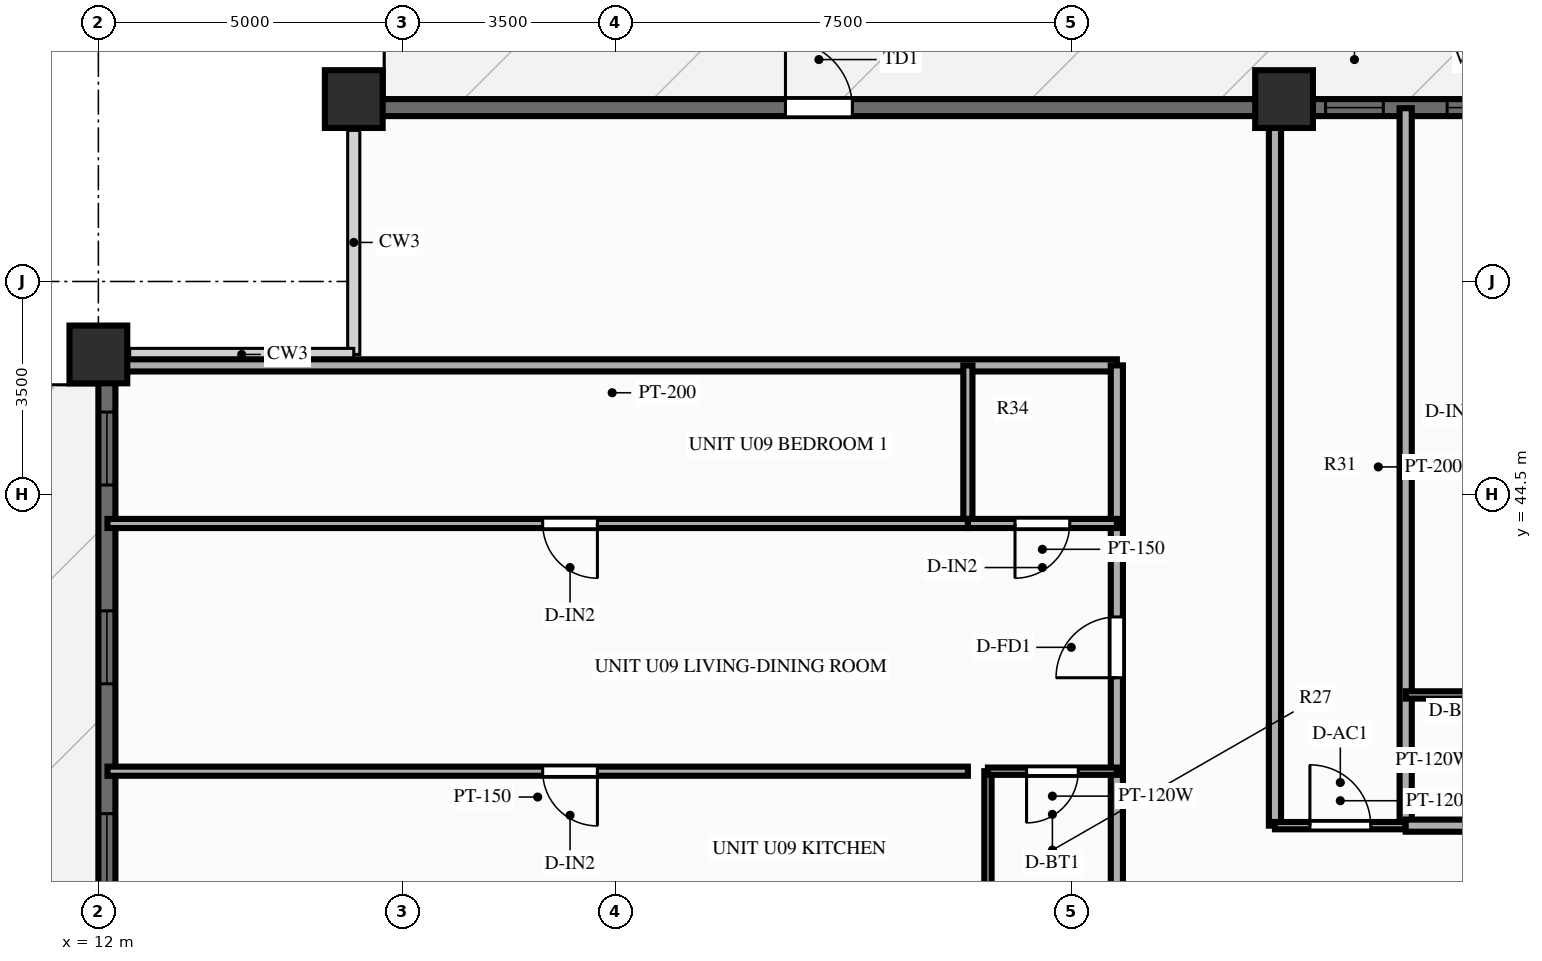
"""IFC4 building model, lengths in metres.
Left out: names, types, materials, properties, quantities, classifications, styles, units other than length and angle.
Written with IfcOpenShell. Run it as: python <this file> out.ifc"""

import sys

from ifc_helpers import new_model, si_unit, direction, frame, frame_2d, origin, origin_2d, place, context, subcontext, project, spatial, rectangle, extrude, source, transform, mapped, element, fill, save


model = new_model("IFC4")
c1 = context("Model", 3, precision=1e-05, world=origin(), true_north=direction((0.0, 1.0)))
c2 = subcontext(c1, "Body", "Model", "MODEL_VIEW")
j1 = project(units=[si_unit("LENGTHUNIT", "METRE"), si_unit("PLANEANGLEUNIT", "RADIAN")], contexts=[c1])
p1 = place(None, origin())
s1 = spatial("IfcSite", under=j1, at=p1, CompositionType="ELEMENT")
p2 = place(p1, origin())
s2 = spatial("IfcBuilding", under=s1, at=p2, CompositionType="ELEMENT")
p3 = place(p2, frame((0.0, 0.0, 107.85)))
s3 = spatial("IfcBuildingStorey", under=s2, at=p3, CompositionType="ELEMENT", Elevation=107.85)
m1 = source(origin(), c2, "Body", "SweptSolid", [
    extrude(rectangle(XDim=0.95, YDim=0.95, at=origin_2d()), origin(), (0.0, 0.0, 1.0), 3.0),
])
for number, where, z_axis, x_axis in (
    (1, (31.5, 51.0, 0.0), (0.0, 0.0, 1.0), (1.0, 0.0, 0.0)),
    (2, (16.2, 51.0, 0.0), (0.0, 0.0, 1.0), (1.0, 0.0, 0.0)),
    (3, (12.0, 46.8, 0.0), (0.0, 0.0, 1.0), (1.0, 0.0, 0.0)),
):
    element("IfcColumn", number, at=place(p3, frame(where, z_axis=z_axis, x_axis=x_axis)), inside=s3, PredefinedType="COLUMN", context=c2, shape_type="MappedRepresentation", body=[
        mapped(m1, transform((0.0, 0.0, 0.0), scale=1.0)),
    ])
p4 = place(p3, frame((16.2, 50.86, 0.0), z_axis=(0.0, 0.0, 1.0), x_axis=(1.0, 0.0, 0.0)))
e4 = element("IfcWall", 4, at=p4, inside=s3, PredefinedType="SOLIDWALL", context=c2, shape_type="SweptSolid", body=[
    extrude(rectangle(XDim=43.6, YDim=0.28, at=frame_2d((21.8, 0.0))), origin(), (0.0, 0.0, 1.0), 2.28),
])
p5 = place(p4, frame((7.1, 0.0, 0.0)))
e5 = element("IfcOpeningElement", 5, at=p5, cuts=e4, PredefinedType="OPENING", context=c2, shape_type="SweptSolid", body=[
    extrude(rectangle(XDim=1.1, YDim=2.15, at=frame_2d((0.55, 1.075))), frame((0.0, 0.152, 0.0), z_axis=(0.0, -1.0, 0.0), x_axis=(1.0, 0.0, 0.0)), (0.0, 0.0, 1.0), 0.304),
])
p6 = place(p4, frame((15.982, 0.0, 0.25)))
e6 = element("IfcOpeningElement", 6, at=p6, cuts=e4, PredefinedType="OPENING", context=c2, shape_type="SweptSolid", body=[
    extrude(rectangle(XDim=0.95, YDim=1.5, at=frame_2d((0.475, 0.75))), frame((0.0, 0.152, 0.0), z_axis=(0.0, -1.0, 0.0), x_axis=(1.0, 0.0, 0.0)), (0.0, 0.0, 1.0), 0.304),
])
p7 = place(p4, frame((17.982, 0.0, 0.25)))
e7 = element("IfcOpeningElement", 7, at=p7, cuts=e4, PredefinedType="OPENING", context=c2, shape_type="SweptSolid", body=[
    extrude(rectangle(XDim=1.2, YDim=1.5, at=frame_2d((0.6, 0.75))), frame((0.0, 0.152, 0.0), z_axis=(0.0, -1.0, 0.0), x_axis=(1.0, 0.0, 0.0)), (0.0, 0.0, 1.0), 0.304),
])
p8 = place(p4, frame((20.77, 0.0, 0.25)))
e8 = element("IfcOpeningElement", 8, at=p8, cuts=e4, PredefinedType="OPENING", context=c2, shape_type="SweptSolid", body=[
    extrude(rectangle(XDim=1.2, YDim=1.5, at=frame_2d((0.6, 0.75))), frame((0.0, 0.152, 0.0), z_axis=(0.0, -1.0, 0.0), x_axis=(1.0, 0.0, 0.0)), (0.0, 0.0, 1.0), 0.304),
])
p9 = place(p4, frame((23.78, 0.0, 0.25)))
e9 = element("IfcOpeningElement", 9, at=p9, cuts=e4, PredefinedType="OPENING", context=c2, shape_type="SweptSolid", body=[
    extrude(rectangle(XDim=1.2, YDim=1.5, at=frame_2d((0.6, 0.75))), frame((0.0, 0.152, 0.0), z_axis=(0.0, -1.0, 0.0), x_axis=(1.0, 0.0, 0.0)), (0.0, 0.0, 1.0), 0.304),
])
p10 = place(p4, frame((26.335, 0.0, 0.25)))
e10 = element("IfcOpeningElement", 10, at=p10, cuts=e4, PredefinedType="OPENING", context=c2, shape_type="SweptSolid", body=[
    extrude(rectangle(XDim=1.2, YDim=1.5, at=frame_2d((0.6, 0.75))), frame((0.0, 0.152, 0.0), z_axis=(0.0, -1.0, 0.0), x_axis=(1.0, 0.0, 0.0)), (0.0, 0.0, 1.0), 0.304),
])
p11 = place(p4, frame((35.35, 0.0, 0.25)))
e11 = element("IfcOpeningElement", 11, at=p11, cuts=e4, PredefinedType="OPENING", context=c2, shape_type="SweptSolid", body=[
    extrude(rectangle(XDim=1.2, YDim=1.5, at=frame_2d((0.6, 0.75))), frame((0.0, 0.152, 0.0), z_axis=(0.0, -1.0, 0.0), x_axis=(1.0, 0.0, 0.0)), (0.0, 0.0, 1.0), 0.304),
])
p12 = place(p3, frame((12.14, 7.2, 0.0), z_axis=(0.0, 0.0, 1.0), x_axis=(0.0, 1.0, 0.0)))
e12 = element("IfcWall", 12, at=p12, inside=s3, PredefinedType="SOLIDWALL", context=c2, shape_type="SweptSolid", body=[
    extrude(rectangle(XDim=39.6, YDim=0.28, at=frame_2d((19.8, 0.0))), origin(), (0.0, 0.0, 1.0), 2.28),
])
p13 = place(p12, frame((0.945, 0.0, 0.25)))
e13 = element("IfcOpeningElement", 13, at=p13, cuts=e12, PredefinedType="OPENING", context=c2, shape_type="SweptSolid", body=[
    extrude(rectangle(XDim=1.2, YDim=1.5, at=frame_2d((0.6, 0.75))), frame((0.0, 0.152, 0.0), z_axis=(0.0, -1.0, 0.0), x_axis=(1.0, 0.0, 0.0)), (0.0, 0.0, 1.0), 0.304),
])
p14 = place(p12, frame((4.213, 0.0, 0.25)))
e14 = element("IfcOpeningElement", 14, at=p14, cuts=e12, PredefinedType="OPENING", context=c2, shape_type="SweptSolid", body=[
    extrude(rectangle(XDim=1.2, YDim=1.5, at=frame_2d((0.6, 0.75))), frame((0.0, 0.152, 0.0), z_axis=(0.0, -1.0, 0.0), x_axis=(1.0, 0.0, 0.0)), (0.0, 0.0, 1.0), 0.304),
])
p15 = place(p12, frame((7.55, 0.0, 0.25)))
e15 = element("IfcOpeningElement", 15, at=p15, cuts=e12, PredefinedType="OPENING", context=c2, shape_type="SweptSolid", body=[
    extrude(rectangle(XDim=1.2, YDim=1.5, at=frame_2d((0.6, 0.75))), frame((0.0, 0.152, 0.0), z_axis=(0.0, -1.0, 0.0), x_axis=(1.0, 0.0, 0.0)), (0.0, 0.0, 1.0), 0.304),
])
p16 = place(p12, frame((13.483, 0.0, 0.25)))
e16 = element("IfcOpeningElement", 16, at=p16, cuts=e12, PredefinedType="OPENING", context=c2, shape_type="SweptSolid", body=[
    extrude(rectangle(XDim=1.2, YDim=1.5, at=frame_2d((0.6, 0.75))), frame((0.0, 0.152, 0.0), z_axis=(0.0, -1.0, 0.0), x_axis=(1.0, 0.0, 0.0)), (0.0, 0.0, 1.0), 0.304),
])
p17 = place(p12, frame((16.82, 0.0, 0.25)))
e17 = element("IfcOpeningElement", 17, at=p17, cuts=e12, PredefinedType="OPENING", context=c2, shape_type="SweptSolid", body=[
    extrude(rectangle(XDim=1.2, YDim=1.5, at=frame_2d((0.6, 0.75))), frame((0.0, 0.152, 0.0), z_axis=(0.0, -1.0, 0.0), x_axis=(1.0, 0.0, 0.0)), (0.0, 0.0, 1.0), 0.304),
])
p18 = place(p12, frame((19.2, 0.0, 0.25)))
e18 = element("IfcOpeningElement", 18, at=p18, cuts=e12, PredefinedType="OPENING", context=c2, shape_type="SweptSolid", body=[
    extrude(rectangle(XDim=1.2, YDim=1.5, at=frame_2d((0.6, 0.75))), frame((0.0, 0.152, 0.0), z_axis=(0.0, -1.0, 0.0), x_axis=(1.0, 0.0, 0.0)), (0.0, 0.0, 1.0), 0.304),
])
p19 = place(p12, frame((21.578, 0.0, 0.25)))
e19 = element("IfcOpeningElement", 19, at=p19, cuts=e12, PredefinedType="OPENING", context=c2, shape_type="SweptSolid", body=[
    extrude(rectangle(XDim=1.2, YDim=1.5, at=frame_2d((0.6, 0.75))), frame((0.0, 0.152, 0.0), z_axis=(0.0, -1.0, 0.0), x_axis=(1.0, 0.0, 0.0)), (0.0, 0.0, 1.0), 0.304),
])
p20 = place(p12, frame((24.713, 0.0, 0.0)))
e20 = element("IfcOpeningElement", 20, at=p20, cuts=e12, PredefinedType="OPENING", context=c2, shape_type="SweptSolid", body=[
    extrude(rectangle(XDim=1.6, YDim=2.15, at=frame_2d((0.8, 1.075))), frame((0.0, 0.152, 0.0), z_axis=(0.0, -1.0, 0.0), x_axis=(1.0, 0.0, 0.0)), (0.0, 0.0, 1.0), 0.304),
])
p21 = place(p12, frame((29.305, 0.0, 0.25)))
e21 = element("IfcOpeningElement", 21, at=p21, cuts=e12, PredefinedType="OPENING", context=c2, shape_type="SweptSolid", body=[
    extrude(rectangle(XDim=0.7, YDim=1.5, at=frame_2d((0.35, 0.75))), frame((0.0, 0.152, 0.0), z_axis=(0.0, -1.0, 0.0), x_axis=(1.0, 0.0, 0.0)), (0.0, 0.0, 1.0), 0.304),
])
p22 = place(p12, frame((30.848, 0.0, 0.25)))
e22 = element("IfcOpeningElement", 22, at=p22, cuts=e12, PredefinedType="OPENING", context=c2, shape_type="SweptSolid", body=[
    extrude(rectangle(XDim=1.2, YDim=1.5, at=frame_2d((0.6, 0.75))), frame((0.0, 0.152, 0.0), z_axis=(0.0, -1.0, 0.0), x_axis=(1.0, 0.0, 0.0)), (0.0, 0.0, 1.0), 0.304),
])
p23 = place(p12, frame((34.183, 0.0, 0.25)))
e23 = element("IfcOpeningElement", 23, at=p23, cuts=e12, PredefinedType="OPENING", context=c2, shape_type="SweptSolid", body=[
    extrude(rectangle(XDim=1.2, YDim=1.5, at=frame_2d((0.6, 0.75))), frame((0.0, 0.152, 0.0), z_axis=(0.0, -1.0, 0.0), x_axis=(1.0, 0.0, 0.0)), (0.0, 0.0, 1.0), 0.304),
])
p24 = place(p12, frame((37.452, 0.0, 0.25)))
e24 = element("IfcOpeningElement", 24, at=p24, cuts=e12, PredefinedType="OPENING", context=c2, shape_type="SweptSolid", body=[
    extrude(rectangle(XDim=1.2, YDim=1.5, at=frame_2d((0.6, 0.75))), frame((0.0, 0.152, 0.0), z_axis=(0.0, -1.0, 0.0), x_axis=(1.0, 0.0, 0.0)), (0.0, 0.0, 1.0), 0.304),
])
p25 = place(p3, frame((31.35, 39.05, 0.0), z_axis=(0.0, 0.0, 1.0), x_axis=(0.0, 1.0, 0.0)))
e25 = element("IfcWall", 25, at=p25, inside=s3, PredefinedType="PARTITIONING", context=c2, shape_type="SweptSolid", body=[
    extrude(rectangle(XDim=11.8, YDim=0.2, at=frame_2d((5.9, 0.0))), origin(), (0.0, 0.0, 1.0), 2.34),
])
p26 = place(p3, frame((33.5, 39.05, 0.0), z_axis=(0.0, 0.0, 1.0), x_axis=(0.0, 1.0, 0.0)))
e26 = element("IfcWall", 26, at=p26, inside=s3, PredefinedType="PARTITIONING", context=c2, shape_type="SweptSolid", body=[
    extrude(rectangle(XDim=11.8, YDim=0.2, at=frame_2d((5.9, 0.0))), origin(), (0.0, 0.0, 1.0), 2.79),
])
p27 = place(p3, frame((31.35, 39.05, 0.0), z_axis=(0.0, 0.0, 1.0), x_axis=(1.0, 0.0, 0.0)))
e27 = element("IfcWall", 27, at=p27, inside=s3, PredefinedType="PARTITIONING", context=c2, shape_type="SweptSolid", body=[
    extrude(rectangle(XDim=2.15, YDim=0.12, at=frame_2d((1.075, 0.0))), origin(), (0.0, 0.0, 1.0), 2.79),
])
p28 = place(p27, frame((0.575, 0.0, 0.0)))
e28 = element("IfcOpeningElement", 28, at=p28, cuts=e27, PredefinedType="OPENING", context=c2, shape_type="SweptSolid", body=[
    extrude(rectangle(XDim=1.0, YDim=2.1, at=frame_2d((0.5, 1.05))), frame((0.0, 0.072, 0.0), z_axis=(0.0, -1.0, 0.0), x_axis=(1.0, 0.0, 0.0)), (0.0, 0.0, 1.0), 0.144),
])
p29 = place(p3, frame((33.5, 39.05, 0.0), z_axis=(0.0, 0.0, 1.0), x_axis=(1.0, 0.0, 0.0)))
e29 = element("IfcWall", 29, at=p29, inside=s3, PredefinedType="PARTITIONING", context=c2, shape_type="SweptSolid", body=[
    extrude(rectangle(XDim=2.564, YDim=0.2, at=frame_2d((1.282, 0.0))), origin(), (0.0, 0.0, 1.0), 2.79),
])
p30 = place(p3, frame((33.5, 41.2, 0.0), z_axis=(0.0, 0.0, 1.0), x_axis=(1.0, 0.0, 0.0)))
e30 = element("IfcWall", 30, at=p30, inside=s3, PredefinedType="PARTITIONING", context=c2, shape_type="SweptSolid", body=[
    extrude(rectangle(XDim=2.564, YDim=0.12, at=frame_2d((1.282, 0.0))), origin(), (0.0, 0.0, 1.0), 2.79),
])
p31 = place(p3, frame((28.75, 46.62, 0.0), z_axis=(0.0, 0.0, 1.0), x_axis=(-1.0, 0.0, 0.0)))
e31 = element("IfcWall", 31, at=p31, inside=s3, PredefinedType="PARTITIONING", context=c2, shape_type="SweptSolid", body=[
    extrude(rectangle(XDim=16.6, YDim=0.2, at=frame_2d((8.3, 0.0))), origin(), (0.0, 0.0, 1.0), 2.79),
])
p32 = place(p3, frame((28.75, 37.35, 0.0), z_axis=(0.0, 0.0, 1.0), x_axis=(0.0, 1.0, 0.0)))
e32 = element("IfcWall", 32, at=p32, inside=s3, PredefinedType="PARTITIONING", context=c2, shape_type="SweptSolid", body=[
    extrude(rectangle(XDim=2.595, YDim=0.2, at=frame_2d((1.298, 0.0))), origin(), (0.0, 0.0, 1.0), 2.79),
])
p33 = place(p3, frame((28.75, 39.946, 0.0), z_axis=(0.0, 0.0, 1.0), x_axis=(0.0, 1.0, 0.0)))
e33 = element("IfcWall", 33, at=p33, inside=s3, PredefinedType="PARTITIONING", context=c2, shape_type="SweptSolid", body=[
    extrude(rectangle(XDim=4.074, YDim=0.2, at=frame_2d((2.037, 0.0))), origin(), (0.0, 0.0, 1.0), 2.79),
])
p34 = place(p33, frame((1.537, 0.0, 0.0)))
e34 = element("IfcOpeningElement", 34, at=p34, cuts=e33, PredefinedType="OPENING", context=c2, shape_type="SweptSolid", body=[
    extrude(rectangle(XDim=1.0, YDim=2.15, at=frame_2d((0.5, 1.075))), frame((0.0, 0.112, 0.0), z_axis=(0.0, -1.0, 0.0), x_axis=(1.0, 0.0, 0.0)), (0.0, 0.0, 1.0), 0.224),
])
p35 = place(p3, frame((28.75, 44.02, 0.0), z_axis=(0.0, 0.0, 1.0), x_axis=(0.0, 1.0, 0.0)))
e35 = element("IfcWall", 35, at=p35, inside=s3, PredefinedType="PARTITIONING", context=c2, shape_type="SweptSolid", body=[
    extrude(rectangle(XDim=2.6, YDim=0.2, at=frame_2d((1.3, 0.0))), origin(), (0.0, 0.0, 1.0), 2.79),
])
p36 = place(p3, frame((26.63, 37.35, 0.0), z_axis=(0.0, 0.0, 1.0), x_axis=(0.0, 1.0, 0.0)))
e36 = element("IfcWall", 36, at=p36, inside=s3, PredefinedType="PARTITIONING", context=c2, shape_type="SweptSolid", body=[
    extrude(rectangle(XDim=2.595, YDim=0.12, at=frame_2d((1.298, 0.0))), origin(), (0.0, 0.0, 1.0), 2.79),
])
p37 = place(p3, frame((26.3, 44.02, 0.0), z_axis=(0.0, 0.0, 1.0), x_axis=(0.0, 1.0, 0.0)))
e37 = element("IfcWall", 37, at=p37, inside=s3, PredefinedType="PARTITIONING", context=c2, shape_type="SweptSolid", body=[
    extrude(rectangle(XDim=2.6, YDim=0.15, at=frame_2d((1.3, 0.0))), origin(), (0.0, 0.0, 1.0), 2.79),
])
p38 = place(p3, frame((28.75, 39.946, 0.0), z_axis=(0.0, 0.0, 1.0), x_axis=(-1.0, 0.0, 0.0)))
e38 = element("IfcWall", 38, at=p38, inside=s3, PredefinedType="PARTITIONING", context=c2, shape_type="SweptSolid", body=[
    extrude(rectangle(XDim=2.12, YDim=0.12, at=frame_2d((1.06, 0.0))), origin(), (0.0, 0.0, 1.0), 2.79),
])
p39 = place(p38, frame((0.635, 0.0, 0.0)))
e39 = element("IfcOpeningElement", 39, at=p39, cuts=e38, PredefinedType="OPENING", context=c2, shape_type="SweptSolid", body=[
    extrude(rectangle(XDim=0.85, YDim=2.05, at=frame_2d((0.425, 1.025))), frame((0.0, 0.072, 0.0), z_axis=(0.0, -1.0, 0.0), x_axis=(1.0, 0.0, 0.0)), (0.0, 0.0, 1.0), 0.144),
])
p40 = place(p3, frame((26.3, 39.946, 0.0), z_axis=(0.0, 0.0, 1.0), x_axis=(-1.0, 0.0, 0.0)))
e40 = element("IfcWall", 40, at=p40, inside=s3, PredefinedType="PARTITIONING", context=c2, shape_type="SweptSolid", body=[
    extrude(rectangle(XDim=14.15, YDim=0.15, at=frame_2d((7.075, 0.0))), origin(), (0.0, 0.0, 1.0), 2.79),
])
p41 = place(p40, frame((6.093, 0.0, 0.0)))
e41 = element("IfcOpeningElement", 41, at=p41, cuts=e40, PredefinedType="OPENING", context=c2, shape_type="SweptSolid", body=[
    extrude(rectangle(XDim=0.9, YDim=2.1, at=frame_2d((0.45, 1.05))), frame((0.0, 0.087, 0.0), z_axis=(0.0, -1.0, 0.0), x_axis=(1.0, 0.0, 0.0)), (0.0, 0.0, 1.0), 0.174),
])
p42 = place(p3, frame((28.75, 44.02, 0.0), z_axis=(0.0, 0.0, 1.0), x_axis=(-1.0, 0.0, 0.0)))
e42 = element("IfcWall", 42, at=p42, inside=s3, PredefinedType="PARTITIONING", context=c2, shape_type="SweptSolid", body=[
    extrude(rectangle(XDim=2.45, YDim=0.15, at=frame_2d((1.225, 0.0))), origin(), (0.0, 0.0, 1.0), 2.79),
])
p43 = place(p42, frame((0.775, 0.0, 0.0)))
e43 = element("IfcOpeningElement", 43, at=p43, cuts=e42, PredefinedType="OPENING", context=c2, shape_type="SweptSolid", body=[
    extrude(rectangle(XDim=0.9, YDim=2.1, at=frame_2d((0.45, 1.05))), frame((0.0, 0.087, 0.0), z_axis=(0.0, -1.0, 0.0), x_axis=(1.0, 0.0, 0.0)), (0.0, 0.0, 1.0), 0.174),
])
p44 = place(p3, frame((26.3, 44.02, 0.0), z_axis=(0.0, 0.0, 1.0), x_axis=(-1.0, 0.0, 0.0)))
e44 = element("IfcWall", 44, at=p44, inside=s3, PredefinedType="PARTITIONING", context=c2, shape_type="SweptSolid", body=[
    extrude(rectangle(XDim=14.15, YDim=0.15, at=frame_2d((7.075, 0.0))), origin(), (0.0, 0.0, 1.0), 2.79),
])
p45 = place(p44, frame((6.093, 0.0, 0.0)))
e45 = element("IfcOpeningElement", 45, at=p45, cuts=e44, PredefinedType="OPENING", context=c2, shape_type="SweptSolid", body=[
    extrude(rectangle(XDim=0.9, YDim=2.1, at=frame_2d((0.45, 1.05))), frame((0.0, 0.087, 0.0), z_axis=(0.0, -1.0, 0.0), x_axis=(1.0, 0.0, 0.0)), (0.0, 0.0, 1.0), 0.174),
])
m2 = source(origin(), c2, "Body", "SweptSolid", [
    extrude(rectangle(XDim=1.1, YDim=2.15, at=frame_2d((0.55, 1.075))), frame((0.0, 0.025, 0.0), z_axis=(0.0, -1.0, 0.0), x_axis=(1.0, 0.0, 0.0)), (0.0, 0.0, 1.0), 0.05),
])
p46 = place(p5, origin())
e46 = element("IfcDoor", 46, at=p46, inside=s3, OperationType="SINGLE_SWING_LEFT", PredefinedType="DOOR", context=c2, shape_type="MappedRepresentation", body=[
    mapped(m2, transform((0.0, 0.0, 0.0), scale=1.0)),
])
fill(e5, e46)
m3 = source(origin(), c2, "Body", "SweptSolid", [
    extrude(rectangle(XDim=0.95, YDim=1.5, at=frame_2d((0.475, 0.75))), frame((0.0, 0.03, 0.0), z_axis=(0.0, -1.0, 0.0), x_axis=(1.0, 0.0, 0.0)), (0.0, 0.0, 1.0), 0.06),
])
p47 = place(p6, origin())
e47 = element("IfcWindow", 47, at=p47, inside=s3, PartitioningType="SINGLE_PANEL", PredefinedType="WINDOW", context=c2, shape_type="MappedRepresentation", body=[
    mapped(m3, transform((0.0, 0.0, 0.0), scale=1.0)),
])
fill(e6, e47)
m4 = source(origin(), c2, "Body", "SweptSolid", [
    extrude(rectangle(XDim=1.2, YDim=1.5, at=frame_2d((0.6, 0.75))), frame((0.0, 0.03, 0.0), z_axis=(0.0, -1.0, 0.0), x_axis=(1.0, 0.0, 0.0)), (0.0, 0.0, 1.0), 0.06),
])
p48 = place(p7, origin())
e48 = element("IfcWindow", 48, at=p48, inside=s3, PartitioningType="SINGLE_PANEL", PredefinedType="WINDOW", context=c2, shape_type="MappedRepresentation", body=[
    mapped(m4, transform((0.0, 0.0, 0.0), scale=1.0)),
])
fill(e7, e48)
p49 = place(p22, origin())
e49 = element("IfcWindow", 49, at=p49, inside=s3, PartitioningType="SINGLE_PANEL", PredefinedType="WINDOW", context=c2, shape_type="MappedRepresentation", body=[
    mapped(m4, transform((0.0, 0.0, 0.0), scale=1.0)),
])
fill(e22, e49)
p50 = place(p23, origin())
e50 = element("IfcWindow", 50, at=p50, inside=s3, PartitioningType="SINGLE_PANEL", PredefinedType="WINDOW", context=c2, shape_type="MappedRepresentation", body=[
    mapped(m4, transform((0.0, 0.0, 0.0), scale=1.0)),
])
fill(e23, e50)
p51 = place(p24, origin())
e51 = element("IfcWindow", 51, at=p51, inside=s3, PartitioningType="SINGLE_PANEL", PredefinedType="WINDOW", context=c2, shape_type="MappedRepresentation", body=[
    mapped(m4, transform((0.0, 0.0, 0.0), scale=1.0)),
])
fill(e24, e51)
m5 = source(origin(), c2, "Body", "SweptSolid", [
    extrude(rectangle(XDim=1.0, YDim=2.1, at=frame_2d((0.5, 1.05))), frame((0.0, 0.025, 0.0), z_axis=(0.0, -1.0, 0.0), x_axis=(1.0, 0.0, 0.0)), (0.0, 0.0, 1.0), 0.05),
])
p52 = place(p28, origin())
e52 = element("IfcDoor", 52, at=p52, inside=s3, OperationType="SINGLE_SWING_LEFT", PredefinedType="DOOR", context=c2, shape_type="MappedRepresentation", body=[
    mapped(m5, transform((0.0, 0.0, 0.0), scale=1.0)),
])
fill(e28, e52)
m6 = source(origin(), c2, "Body", "SweptSolid", [
    extrude(rectangle(XDim=1.0, YDim=2.15, at=frame_2d((0.5, 1.075))), frame((0.0, 0.025, 0.0), z_axis=(0.0, -1.0, 0.0), x_axis=(1.0, 0.0, 0.0)), (0.0, 0.0, 1.0), 0.05),
])
p53 = place(p34, origin())
e53 = element("IfcDoor", 53, at=p53, inside=s3, OperationType="SINGLE_SWING_LEFT", PredefinedType="DOOR", context=c2, shape_type="MappedRepresentation", body=[
    mapped(m6, transform((0.0, 0.0, 0.0), scale=1.0)),
])
fill(e34, e53)
m7 = source(origin(), c2, "Body", "SweptSolid", [
    extrude(rectangle(XDim=0.85, YDim=2.05, at=frame_2d((0.425, 1.025))), frame((0.0, 0.025, 0.0), z_axis=(0.0, -1.0, 0.0), x_axis=(1.0, 0.0, 0.0)), (0.0, 0.0, 1.0), 0.05),
])
p54 = place(p39, origin())
e54 = element("IfcDoor", 54, at=p54, inside=s3, OperationType="SINGLE_SWING_RIGHT", PredefinedType="DOOR", context=c2, shape_type="MappedRepresentation", body=[
    mapped(m7, transform((0.0, 0.0, 0.0), scale=1.0)),
])
fill(e39, e54)
m8 = source(origin(), c2, "Body", "SweptSolid", [
    extrude(rectangle(XDim=0.9, YDim=2.1, at=frame_2d((0.45, 1.05))), frame((0.0, 0.025, 0.0), z_axis=(0.0, -1.0, 0.0), x_axis=(1.0, 0.0, 0.0)), (0.0, 0.0, 1.0), 0.05),
])
p55 = place(p41, origin())
e55 = element("IfcDoor", 55, at=p55, inside=s3, OperationType="SINGLE_SWING_LEFT", PredefinedType="DOOR", context=c2, shape_type="MappedRepresentation", body=[
    mapped(m8, transform((0.0, 0.0, 0.0), scale=1.0)),
])
fill(e41, e55)
p56 = place(p43, origin())
e56 = element("IfcDoor", 56, at=p56, inside=s3, OperationType="SINGLE_SWING_RIGHT", PredefinedType="DOOR", context=c2, shape_type="MappedRepresentation", body=[
    mapped(m8, transform((0.0, 0.0, 0.0), scale=1.0)),
])
fill(e43, e56)
p57 = place(p45, origin())
e57 = element("IfcDoor", 57, at=p57, inside=s3, OperationType="SINGLE_SWING_LEFT", PredefinedType="DOOR", context=c2, shape_type="MappedRepresentation", body=[
    mapped(m8, transform((0.0, 0.0, 0.0), scale=1.0)),
])
fill(e45, e57)
save(model, sys.argv[1])
